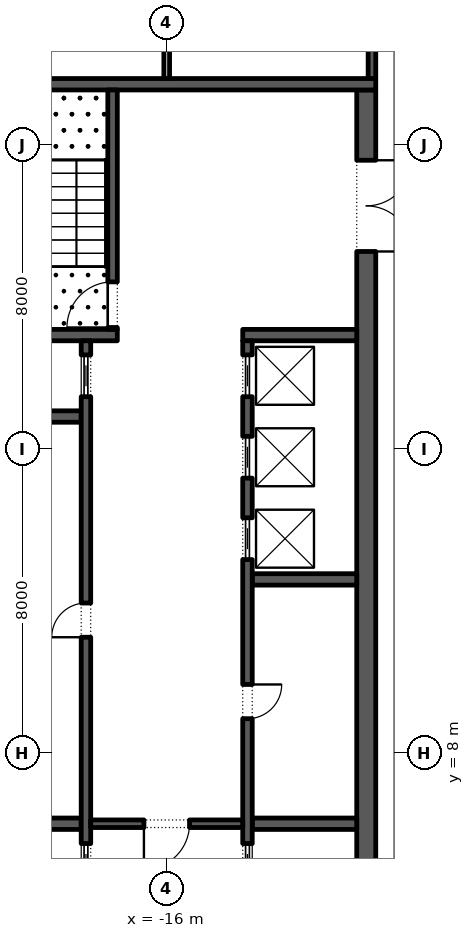
"""IFC4 building model, lengths in metres.
Left out: names, types, materials, properties, quantities, classifications, styles, units other than length and angle.
Written with IfcOpenShell. Run it as: python <this file> out.ifc"""

import sys

from ifc_helpers import new_model, si_unit, direction, frame, frame_2d, origin, place, context, subcontext, project, spatial, rectangle, extrude, element, fill, save


model = new_model("IFC4")
c1 = context("Model", 3, precision=1e-05, world=origin(), true_north=direction((0.0, 1.0)))
c2 = subcontext(c1, "Body", "Model", "MODEL_VIEW")
j1 = project(units=[si_unit("LENGTHUNIT", "METRE"), si_unit("PLANEANGLEUNIT", "RADIAN")], contexts=[c1])
p1 = place(None, origin())
s1 = spatial("IfcSite", under=j1, at=p1, CompositionType="ELEMENT")
p2 = place(p1, origin())
s2 = spatial("IfcBuilding", under=s1, at=p2, CompositionType="ELEMENT")
p3 = place(p2, frame((0.0, 0.0, 303.0)))
s3 = spatial("IfcBuildingStorey", under=s2, at=p3, CompositionType="ELEMENT", Elevation=303.0)
p4 = place(p3, frame((-10.75, -2.45, 0.0), z_axis=(0.0, 0.0, 1.0), x_axis=(0.0, 1.0, 0.0)))
e1 = element("IfcWall", 1, at=p4, inside=s3, PredefinedType="SHEAR", context=c2, shape_type="SweptSolid", body=[
    extrude(rectangle(XDim=27.9, YDim=0.5, at=frame_2d((13.95, 0.0))), origin(), (0.0, 0.0, 1.0), 5.8),
])
p5 = place(p4, frame((23.65, 0.0, 0.0)))
e2 = element("IfcOpeningElement", 2, at=p5, cuts=e1, PredefinedType="OPENING", context=c2, shape_type="SweptSolid", body=[
    extrude(rectangle(XDim=2.4, YDim=2.1, at=frame_2d((1.2, 1.05))), frame((0.0, 0.26, 0.0), z_axis=(0.0, -1.0, 0.0), x_axis=(1.0, 0.0, 0.0)), (0.0, 0.0, 1.0), 0.52),
])
p6 = place(p4, frame((1.087, 0.0, 0.0)))
e3 = element("IfcOpeningElement", 3, at=p6, cuts=e1, PredefinedType="OPENING", context=c2, shape_type="SweptSolid", body=[
    extrude(rectangle(XDim=0.9, YDim=2.1, at=frame_2d((0.45, 1.05))), frame((0.0, 0.26, 0.0), z_axis=(0.0, -1.0, 0.0), x_axis=(1.0, 0.0, 0.0)), (0.0, 0.0, 1.0), 0.52),
])
p7 = place(p4, frame((4.262, 0.0, 0.0)))
e4 = element("IfcOpeningElement", 4, at=p7, cuts=e1, PredefinedType="OPENING", context=c2, shape_type="SweptSolid", body=[
    extrude(rectangle(XDim=1.0, YDim=2.1, at=frame_2d((0.5, 1.05))), frame((0.0, 0.26, 0.0), z_axis=(0.0, -1.0, 0.0), x_axis=(1.0, 0.0, 0.0)), (0.0, 0.0, 1.0), 0.52),
])
p8 = place(p3, frame((-21.5, 25.6, 0.0), z_axis=(0.0, 0.0, 1.0), x_axis=(1.0, 0.0, 0.0)))
e5 = element("IfcWall", 5, at=p8, inside=s3, PredefinedType="SHEAR", context=c2, shape_type="SweptSolid", body=[
    extrude(rectangle(XDim=11.0, YDim=0.3, at=frame_2d((5.5, 0.0))), origin(), (0.0, 0.0, 1.0), 5.8),
])
p9 = place(p3, frame((-21.0, 19.0, 0.0), z_axis=(0.0, 0.0, 1.0), x_axis=(1.0, 0.0, 0.0)))
e6 = element("IfcWall", 6, at=p9, inside=s3, PredefinedType="SHEAR", context=c2, shape_type="SweptSolid", body=[
    extrude(rectangle(XDim=3.7, YDim=0.3, at=frame_2d((1.85, 0.0))), origin(), (0.0, 0.0, 1.0), 5.8),
])
p10 = place(p3, frame((-17.425, 19.15, 0.0), z_axis=(0.0, 0.0, 1.0), x_axis=(0.0, 1.0, 0.0)))
e7 = element("IfcWall", 7, at=p10, inside=s3, PredefinedType="SHEAR", context=c2, shape_type="SweptSolid", body=[
    extrude(rectangle(XDim=6.3, YDim=0.25, at=frame_2d((3.15, 0.0))), origin(), (0.0, 0.0, 1.0), 5.8),
])
p11 = place(p10, frame((0.05, 0.0, 0.0)))
e8 = element("IfcOpeningElement", 8, at=p11, cuts=e7, PredefinedType="OPENING", context=c2, shape_type="SweptSolid", body=[
    extrude(rectangle(XDim=1.2, YDim=2.1, at=frame_2d((0.6, 1.05))), frame((0.0, 0.135, 0.0), z_axis=(0.0, -1.0, 0.0), x_axis=(1.0, 0.0, 0.0)), (0.0, 0.0, 1.0), 0.27),
])
for number, where, z_axis, x_axis in (
    (9, (-21.0, 6.143, 0.0), (0.0, 0.0, 1.0), (1.0, 0.0, 0.0)),
    (10, (-21.0, 16.857, 0.0), (0.0, 0.0, 1.0), (1.0, 0.0, 0.0)),
):
    element("IfcWall", number, at=place(p3, frame(where, z_axis=z_axis, x_axis=x_axis)), inside=s3, PredefinedType="SHEAR", context=c2, shape_type="SweptSolid", body=[
        extrude(rectangle(XDim=2.75, YDim=0.3, at=frame_2d((1.375, 0.0))), origin(), (0.0, 0.0, 1.0), 5.8),
    ])
p12 = place(p3, frame((-18.125, 4.15, 0.0), z_axis=(0.0, 0.0, 1.0), x_axis=(0.0, 1.0, 0.0)))
e11 = element("IfcWall", 11, at=p12, inside=s3, PredefinedType="SHEAR", context=c2, shape_type="SweptSolid", body=[
    extrude(rectangle(XDim=14.7, YDim=0.25, at=frame_2d((7.35, 0.0))), origin(), (0.0, 0.0, 1.0), 5.8),
])
p13 = place(p12, frame((6.9, 0.0, 0.0)))
e12 = element("IfcOpeningElement", 12, at=p13, cuts=e11, PredefinedType="OPENING", context=c2, shape_type="SweptSolid", body=[
    extrude(rectangle(XDim=0.9, YDim=2.1, at=frame_2d((0.45, 1.05))), frame((0.0, 0.135, 0.0), z_axis=(0.0, -1.0, 0.0), x_axis=(1.0, 0.0, 0.0)), (0.0, 0.0, 1.0), 0.27),
])
p14 = place(p12, frame((0.371, 0.0, 0.0)))
e13 = element("IfcOpeningElement", 13, at=p14, cuts=e11, PredefinedType="OPENING", context=c2, shape_type="SweptSolid", body=[
    extrude(rectangle(XDim=1.1, YDim=2.1, at=frame_2d((0.55, 1.05))), frame((0.0, 0.135, 0.0), z_axis=(0.0, -1.0, 0.0), x_axis=(1.0, 0.0, 0.0)), (0.0, 0.0, 1.0), 0.27),
])
p15 = place(p12, frame((13.229, 0.0, 0.0)))
e14 = element("IfcOpeningElement", 14, at=p15, cuts=e11, PredefinedType="OPENING", context=c2, shape_type="SweptSolid", body=[
    extrude(rectangle(XDim=1.1, YDim=2.1, at=frame_2d((0.55, 1.05))), frame((0.0, 0.135, 0.0), z_axis=(0.0, -1.0, 0.0), x_axis=(1.0, 0.0, 0.0)), (0.0, 0.0, 1.0), 0.27),
])
for number, where, z_axis, x_axis in (
    (15, (-13.75, 6.143, 0.0), (0.0, 0.0, 1.0), (1.0, 0.0, 0.0)),
    (16, (-13.75, 12.571, 0.0), (0.0, 0.0, 1.0), (1.0, 0.0, 0.0)),
):
    element("IfcWall", number, at=place(p3, frame(where, z_axis=z_axis, x_axis=x_axis)), inside=s3, PredefinedType="SHEAR", context=c2, shape_type="SweptSolid", body=[
        extrude(rectangle(XDim=2.75, YDim=0.3, at=frame_2d((1.375, 0.0))), origin(), (0.0, 0.0, 1.0), 5.8),
    ])
p16 = place(p3, frame((-14.0, 19.0, 0.0), z_axis=(0.0, 0.0, 1.0), x_axis=(1.0, 0.0, 0.0)))
e17 = element("IfcWall", 17, at=p16, inside=s3, PredefinedType="SHEAR", context=c2, shape_type="SweptSolid", body=[
    extrude(rectangle(XDim=3.0, YDim=0.3, at=frame_2d((1.5, 0.0))), origin(), (0.0, 0.0, 1.0), 5.8),
])
p17 = place(p3, frame((-13.875, -2.45, 0.0), z_axis=(0.0, 0.0, 1.0), x_axis=(0.0, 1.0, 0.0)))
e18 = element("IfcWall", 18, at=p17, inside=s3, PredefinedType="SHEAR", context=c2, shape_type="SweptSolid", body=[
    extrude(rectangle(XDim=21.3, YDim=0.25, at=frame_2d((10.65, 0.0))), origin(), (0.0, 0.0, 1.0), 5.8),
])
p18 = place(p17, frame((11.357, 0.0, 0.0)))
e19 = element("IfcOpeningElement", 19, at=p18, cuts=e18, PredefinedType="OPENING", context=c2, shape_type="SweptSolid", body=[
    extrude(rectangle(XDim=0.9, YDim=2.1, at=frame_2d((0.45, 1.05))), frame((0.0, 0.135, 0.0), z_axis=(0.0, -1.0, 0.0), x_axis=(1.0, 0.0, 0.0)), (0.0, 0.0, 1.0), 0.27),
])
p19 = place(p17, frame((6.971, 0.0, 0.0)))
e20 = element("IfcOpeningElement", 20, at=p19, cuts=e18, PredefinedType="OPENING", context=c2, shape_type="SweptSolid", body=[
    extrude(rectangle(XDim=1.1, YDim=2.1, at=frame_2d((0.55, 1.05))), frame((0.0, 0.135, 0.0), z_axis=(0.0, -1.0, 0.0), x_axis=(1.0, 0.0, 0.0)), (0.0, 0.0, 1.0), 0.27),
])
p20 = place(p17, frame((15.543, 0.0, 0.0)))
e21 = element("IfcOpeningElement", 21, at=p20, cuts=e18, PredefinedType="OPENING", context=c2, shape_type="SweptSolid", body=[
    extrude(rectangle(XDim=1.1, YDim=2.1, at=frame_2d((0.55, 1.05))), frame((0.0, 0.135, 0.0), z_axis=(0.0, -1.0, 0.0), x_axis=(1.0, 0.0, 0.0)), (0.0, 0.0, 1.0), 0.27),
])
p21 = place(p17, frame((17.686, 0.0, 0.0)))
e22 = element("IfcOpeningElement", 22, at=p21, cuts=e18, PredefinedType="OPENING", context=c2, shape_type="SweptSolid", body=[
    extrude(rectangle(XDim=1.1, YDim=2.1, at=frame_2d((0.55, 1.05))), frame((0.0, 0.135, 0.0), z_axis=(0.0, -1.0, 0.0), x_axis=(1.0, 0.0, 0.0)), (0.0, 0.0, 1.0), 0.27),
])
p22 = place(p17, frame((19.829, 0.0, 0.0)))
e23 = element("IfcOpeningElement", 23, at=p22, cuts=e18, PredefinedType="OPENING", context=c2, shape_type="SweptSolid", body=[
    extrude(rectangle(XDim=1.1, YDim=2.1, at=frame_2d((0.55, 1.05))), frame((0.0, 0.135, 0.0), z_axis=(0.0, -1.0, 0.0), x_axis=(1.0, 0.0, 0.0)), (0.0, 0.0, 1.0), 0.27),
])
p23 = place(p3, frame((-18.0, 6.143, 0.0), z_axis=(0.0, 0.0, 1.0), x_axis=(1.0, 0.0, 0.0)))
e24 = element("IfcWall", 24, at=p23, inside=s3, PredefinedType="SHEAR", context=c2, shape_type="SweptSolid", body=[
    extrude(rectangle(XDim=4.0, YDim=0.2, at=frame_2d((2.0, 0.0))), origin(), (0.0, 0.0, 1.0), 5.8),
])
p24 = place(p23, frame((1.4, 0.0, 0.0)))
e25 = element("IfcOpeningElement", 25, at=p24, cuts=e24, PredefinedType="OPENING", context=c2, shape_type="SweptSolid", body=[
    extrude(rectangle(XDim=1.2, YDim=2.1, at=frame_2d((0.6, 1.05))), frame((0.0, 0.11, 0.0), z_axis=(0.0, -1.0, 0.0), x_axis=(1.0, 0.0, 0.0)), (0.0, 0.0, 1.0), 0.22),
])
p25 = place(p3, frame((-10.6, 25.75, 0.0), z_axis=(0.0, 0.0, 1.0), x_axis=(0.0, 1.0, 0.0)))
e26 = element("IfcWall", 26, at=p25, inside=s3, PredefinedType="SHEAR", context=c2, shape_type="SweptSolid", body=[
    extrude(rectangle(XDim=15.05, YDim=0.2, at=frame_2d((7.525, 0.0))), origin(), (0.0, 0.0, 1.0), 5.8),
])
p26 = place(p25, frame((3.288, 0.0, 0.0)))
e27 = element("IfcOpeningElement", 27, at=p26, cuts=e26, PredefinedType="OPENING", context=c2, shape_type="SweptSolid", body=[
    extrude(rectangle(XDim=0.9, YDim=2.1, at=frame_2d((0.45, 1.05))), frame((0.0, 0.11, 0.0), z_axis=(0.0, -1.0, 0.0), x_axis=(1.0, 0.0, 0.0)), (0.0, 0.0, 1.0), 0.22),
])
p27 = place(p25, frame((10.887, 0.0, 0.0)))
e28 = element("IfcOpeningElement", 28, at=p27, cuts=e26, PredefinedType="OPENING", context=c2, shape_type="SweptSolid", body=[
    extrude(rectangle(XDim=0.9, YDim=2.1, at=frame_2d((0.45, 1.05))), frame((0.0, 0.11, 0.0), z_axis=(0.0, -1.0, 0.0), x_axis=(1.0, 0.0, 0.0)), (0.0, 0.0, 1.0), 0.22),
])
p28 = place(p3, frame((-16.0, 25.75, 0.0), z_axis=(0.0, 0.0, 1.0), x_axis=(0.0, 1.0, 0.0)))
e29 = element("IfcWall", 29, at=p28, inside=s3, PredefinedType="PARTITIONING", context=c2, shape_type="SweptSolid", body=[
    extrude(rectangle(XDim=15.05, YDim=0.15, at=frame_2d((7.525, 0.0))), origin(), (0.0, 0.0, 1.0), 5.8),
])
p29 = place(p13, origin())
e30 = element("IfcDoor", 30, at=p29, inside=s3, OperationType="SINGLE_SWING_RIGHT", PredefinedType="DOOR", context=c2, shape_type="SweptSolid", body=[
    extrude(rectangle(XDim=0.9, YDim=2.1, at=frame_2d((0.45, 1.05))), frame((0.0, 0.125, 0.0), z_axis=(0.0, -1.0, 0.0), x_axis=(1.0, 0.0, 0.0)), (0.0, 0.0, 1.0), 0.05),
])
fill(e12, e30)
p30 = place(p14, origin())
e31 = element("IfcDoor", 31, at=p30, inside=s3, OperationType="SLIDING_TO_LEFT", PredefinedType="DOOR", context=c2, shape_type="SweptSolid", body=[
    extrude(rectangle(XDim=1.1, YDim=2.1, at=frame_2d((0.55, 1.05))), frame((0.0, 0.025, 0.0), z_axis=(0.0, -1.0, 0.0), x_axis=(1.0, 0.0, 0.0)), (0.0, 0.0, 1.0), 0.05),
])
fill(e13, e31)
p31 = place(p15, origin())
e32 = element("IfcDoor", 32, at=p31, inside=s3, OperationType="SLIDING_TO_LEFT", PredefinedType="DOOR", context=c2, shape_type="SweptSolid", body=[
    extrude(rectangle(XDim=1.1, YDim=2.1, at=frame_2d((0.55, 1.05))), frame((0.0, 0.025, 0.0), z_axis=(0.0, -1.0, 0.0), x_axis=(1.0, 0.0, 0.0)), (0.0, 0.0, 1.0), 0.05),
])
fill(e14, e32)
p32 = place(p18, frame((0.9, -0.2, 0.0), z_axis=(0.0, 0.0, 1.0), x_axis=(-1.0, 0.0, 0.0)))
e33 = element("IfcDoor", 33, at=p32, inside=s3, OperationType="SINGLE_SWING_RIGHT", PredefinedType="DOOR", context=c2, shape_type="SweptSolid", body=[
    extrude(rectangle(XDim=0.9, YDim=2.1, at=frame_2d((0.45, 1.05))), frame((0.0, -0.075, 0.0), z_axis=(0.0, -1.0, 0.0), x_axis=(1.0, 0.0, 0.0)), (0.0, 0.0, 1.0), 0.05),
])
fill(e19, e33)
p33 = place(p19, origin())
e34 = element("IfcDoor", 34, at=p33, inside=s3, OperationType="SLIDING_TO_LEFT", PredefinedType="DOOR", context=c2, shape_type="SweptSolid", body=[
    extrude(rectangle(XDim=1.1, YDim=2.1, at=frame_2d((0.55, 1.05))), frame((0.0, 0.025, 0.0), z_axis=(0.0, -1.0, 0.0), x_axis=(1.0, 0.0, 0.0)), (0.0, 0.0, 1.0), 0.05),
])
fill(e20, e34)
p34 = place(p20, origin())
e35 = element("IfcDoor", 35, at=p34, inside=s3, OperationType="SLIDING_TO_LEFT", PredefinedType="DOOR", context=c2, shape_type="SweptSolid", body=[
    extrude(rectangle(XDim=1.1, YDim=2.1, at=frame_2d((0.55, 1.05))), frame((0.0, 0.025, 0.0), z_axis=(0.0, -1.0, 0.0), x_axis=(1.0, 0.0, 0.0)), (0.0, 0.0, 1.0), 0.05),
])
fill(e21, e35)
p35 = place(p21, origin())
e36 = element("IfcDoor", 36, at=p35, inside=s3, OperationType="SLIDING_TO_LEFT", PredefinedType="DOOR", context=c2, shape_type="SweptSolid", body=[
    extrude(rectangle(XDim=1.1, YDim=2.1, at=frame_2d((0.55, 1.05))), frame((0.0, 0.025, 0.0), z_axis=(0.0, -1.0, 0.0), x_axis=(1.0, 0.0, 0.0)), (0.0, 0.0, 1.0), 0.05),
])
fill(e22, e36)
p36 = place(p22, origin())
e37 = element("IfcDoor", 37, at=p36, inside=s3, OperationType="SLIDING_TO_LEFT", PredefinedType="DOOR", context=c2, shape_type="SweptSolid", body=[
    extrude(rectangle(XDim=1.1, YDim=2.1, at=frame_2d((0.55, 1.05))), frame((0.0, 0.025, 0.0), z_axis=(0.0, -1.0, 0.0), x_axis=(1.0, 0.0, 0.0)), (0.0, 0.0, 1.0), 0.05),
])
fill(e23, e37)
p37 = place(p24, frame((1.2, 0.0, 0.0), z_axis=(0.0, 0.0, 1.0), x_axis=(-1.0, 0.0, 0.0)))
e38 = element("IfcDoor", 38, at=p37, inside=s3, OperationType="SINGLE_SWING_LEFT", PredefinedType="DOOR", context=c2, shape_type="SweptSolid", body=[
    extrude(rectangle(XDim=1.2, YDim=2.1, at=frame_2d((0.6, 1.05))), frame((0.0, 0.025, 0.0), z_axis=(0.0, -1.0, 0.0), x_axis=(1.0, 0.0, 0.0)), (0.0, 0.0, 1.0), 0.05),
])
fill(e25, e38)
p38 = place(p5, frame((2.4, 0.0, 0.0), z_axis=(0.0, 0.0, 1.0), x_axis=(-1.0, 0.0, 0.0)))
e39 = element("IfcDoor", 39, at=p38, inside=s3, OperationType="DOUBLE_DOOR_SINGLE_SWING", PredefinedType="DOOR", context=c2, shape_type="SweptSolid", body=[
    extrude(rectangle(XDim=2.4, YDim=2.1, at=frame_2d((1.2, 1.05))), frame((0.0, 0.025, 0.0), z_axis=(0.0, -1.0, 0.0), x_axis=(1.0, 0.0, 0.0)), (0.0, 0.0, 1.0), 0.05),
])
fill(e2, e39)
p39 = place(p11, origin())
e40 = element("IfcDoor", 40, at=p39, inside=s3, OperationType="SINGLE_SWING_RIGHT", PredefinedType="DOOR", context=c2, shape_type="SweptSolid", body=[
    extrude(rectangle(XDim=1.2, YDim=2.1, at=frame_2d((0.6, 1.05))), frame((0.0, 0.025, 0.0), z_axis=(0.0, -1.0, 0.0), x_axis=(1.0, 0.0, 0.0)), (0.0, 0.0, 1.0), 0.05),
])
fill(e8, e40)
save(model, sys.argv[1])
